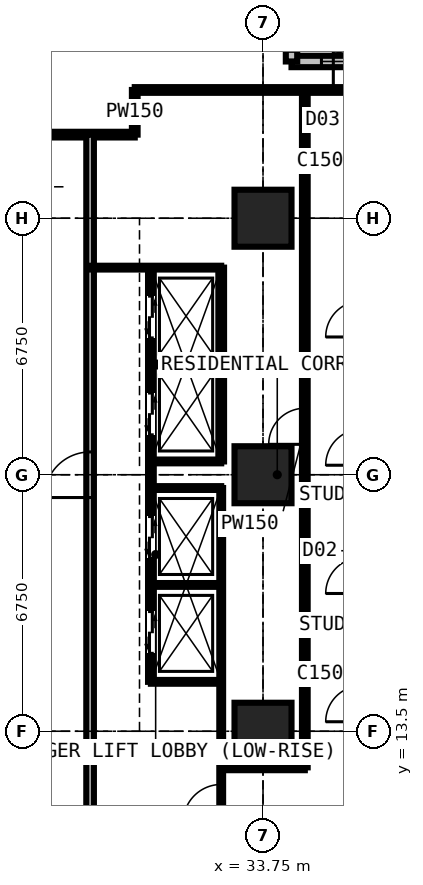
"""IFC4 building model, lengths in metres.
Left out: names, types, materials, properties, quantities, classifications, styles, units other than length and angle.
Written with IfcOpenShell. Run it as: python <this file> out.ifc"""

import sys

from ifc_helpers import new_model, si_unit, direction, frame, frame_2d, origin, origin_2d, place, context, subcontext, project, spatial, rectangle, extrude, element, fill, save


model = new_model("IFC4")
c1 = context("Model", 3, precision=1e-05, world=origin(), true_north=direction((0.0, 1.0)))
c2 = subcontext(c1, "Body", "Model", "MODEL_VIEW")
j1 = project(units=[si_unit("LENGTHUNIT", "METRE"), si_unit("PLANEANGLEUNIT", "RADIAN")], contexts=[c1])
p1 = place(None, origin())
s1 = spatial("IfcSite", under=j1, at=p1, CompositionType="ELEMENT")
p2 = place(p1, origin())
s2 = spatial("IfcBuilding", under=s1, at=p2, CompositionType="ELEMENT")
p3 = place(p2, frame((0.0, 0.0, 126.9)))
s3 = spatial("IfcBuildingStorey", under=s2, at=p3, CompositionType="ELEMENT", Elevation=126.9)
for number, where, z_axis, x_axis in (
    (1, (33.75, 13.5, 0.0), (0.0, 0.0, 1.0), (1.0, 0.0, 0.0)),
    (2, (33.75, 20.25, 0.0), (0.0, 0.0, 1.0), (1.0, 0.0, 0.0)),
    (3, (33.75, 27.0, 0.0), (0.0, 0.0, 1.0), (1.0, 0.0, 0.0)),
):
    element("IfcColumn", number, at=place(p3, frame(where, z_axis=z_axis, x_axis=x_axis)), inside=s3, PredefinedType="COLUMN", context=c2, shape_type="SweptSolid", body=[
        extrude(rectangle(XDim=1.5, YDim=1.5, at=origin_2d()), origin(), (0.0, 0.0, 1.0), 3.6),
    ])
p4 = place(p3, frame((37.875, 31.125, 0.0), z_axis=(0.0, 0.0, 1.0), x_axis=(-1.0, 0.0, 0.0)))
e4 = element("IfcWall", 4, at=p4, inside=s3, PredefinedType="SOLIDWALL", context=c2, shape_type="SweptSolid", body=[
    extrude(rectangle(XDim=3.375, YDim=0.3, at=frame_2d((1.688, 0.0))), origin(), (0.0, 0.0, 1.0), 3.375),
])
p5 = place(p4, frame((0.788, 0.0, 0.6)))
e5 = element("IfcOpeningElement", 5, at=p5, cuts=e4, PredefinedType="OPENING", context=c2, shape_type="SweptSolid", body=[
    extrude(rectangle(XDim=1.8, YDim=2.1, at=frame_2d((0.9, 1.05))), frame((0.0, 0.16, 0.0), z_axis=(0.0, -1.0, 0.0), x_axis=(1.0, 0.0, 0.0)), (0.0, 0.0, 1.0), 0.32),
])
p6 = place(p3, frame((34.5, 31.125, 0.0), z_axis=(0.0, 0.0, 1.0), x_axis=(0.0, 1.0, 0.0)))
e6 = element("IfcWall", 6, at=p6, inside=s3, PredefinedType="SOLIDWALL", context=c2, shape_type="SweptSolid", body=[
    extrude(rectangle(XDim=3.375, YDim=0.3, at=frame_2d((1.688, 0.0))), origin(), (0.0, 0.0, 1.0), 3.375),
])
p7 = place(p6, frame((0.268, 0.0, 0.9)))
e7 = element("IfcOpeningElement", 7, at=p7, cuts=e6, PredefinedType="OPENING", context=c2, shape_type="SweptSolid", body=[
    extrude(rectangle(XDim=1.5, YDim=1.8, at=frame_2d((0.75, 0.9))), frame((0.0, 0.16, 0.0), z_axis=(0.0, -1.0, 0.0), x_axis=(1.0, 0.0, 0.0)), (0.0, 0.0, 1.0), 0.32),
])
p8 = place(p3, frame((11.3, 29.2, 0.0), z_axis=(0.0, 0.0, 1.0), x_axis=(1.0, 0.0, 0.0)))
e8 = element("IfcWall", 8, at=p8, inside=s3, PredefinedType="PARTITIONING", context=c2, shape_type="SweptSolid", body=[
    extrude(rectangle(XDim=19.075, YDim=0.15, at=frame_2d((9.538, 0.0))), origin(), (0.0, 0.0, 1.0), 3.375),
])
p9 = place(p8, frame((6.4, 0.0, 0.0)))
e9 = element("IfcOpeningElement", 9, at=p9, cuts=e8, PredefinedType="OPENING", context=c2, shape_type="SweptSolid", body=[
    extrude(rectangle(XDim=0.95, YDim=2.2, at=frame_2d((0.475, 1.1))), frame((0.0, 0.085, 0.0), z_axis=(0.0, -1.0, 0.0), x_axis=(1.0, 0.0, 0.0)), (0.0, 0.0, 1.0), 0.17),
])
p10 = place(p8, frame((9.2, 0.0, 0.0)))
e10 = element("IfcOpeningElement", 10, at=p10, cuts=e8, PredefinedType="OPENING", context=c2, shape_type="SweptSolid", body=[
    extrude(rectangle(XDim=0.95, YDim=2.2, at=frame_2d((0.475, 1.1))), frame((0.0, 0.085, 0.0), z_axis=(0.0, -1.0, 0.0), x_axis=(1.0, 0.0, 0.0)), (0.0, 0.0, 1.0), 0.17),
])
p11 = place(p8, frame((0.6, 0.0, 0.0)))
e11 = element("IfcOpeningElement", 11, at=p11, cuts=e8, PredefinedType="OPENING", context=c2, shape_type="SweptSolid", body=[
    extrude(rectangle(XDim=1.0, YDim=2.2, at=frame_2d((0.5, 1.1))), frame((0.0, 0.085, 0.0), z_axis=(0.0, -1.0, 0.0), x_axis=(1.0, 0.0, 0.0)), (0.0, 0.0, 1.0), 0.17),
])
p12 = place(p3, frame((29.2, 11.3, 0.0), z_axis=(0.0, 0.0, 1.0), x_axis=(0.0, 1.0, 0.0)))
e12 = element("IfcWall", 12, at=p12, inside=s3, PredefinedType="PARTITIONING", context=c2, shape_type="SweptSolid", body=[
    extrude(rectangle(XDim=17.9, YDim=0.2, at=frame_2d((8.95, 0.0))), origin(), (0.0, 0.0, 1.0), 3.375),
])
p13 = place(p12, frame((8.35, 0.0, 0.0)))
e13 = element("IfcOpeningElement", 13, at=p13, cuts=e12, PredefinedType="OPENING", context=c2, shape_type="SweptSolid", body=[
    extrude(rectangle(XDim=1.2, YDim=2.2, at=frame_2d((0.6, 1.1))), frame((0.0, 0.11, 0.0), z_axis=(0.0, -1.0, 0.0), x_axis=(1.0, 0.0, 0.0)), (0.0, 0.0, 1.0), 0.22),
])
p14 = place(p3, frame((29.2, 25.7, 0.0), z_axis=(0.0, 0.0, 1.0), x_axis=(1.0, 0.0, 0.0)))
e14 = element("IfcWall", 14, at=p14, inside=s3, PredefinedType="SHEAR", context=c2, shape_type="SweptSolid", body=[
    extrude(rectangle(XDim=3.45, YDim=0.1, at=frame_2d((1.725, 0.0))), origin(), (0.0, 0.0, 1.0), 3.375),
])
p15 = place(p3, frame((30.375, 29.2, 0.0), z_axis=(0.0, 0.0, 1.0), x_axis=(0.0, 1.0, 0.0)))
e15 = element("IfcWall", 15, at=p15, inside=s3, PredefinedType="PARTITIONING", context=c2, shape_type="SweptSolid", body=[
    extrude(rectangle(XDim=1.175, YDim=0.15, at=frame_2d((0.587, 0.0))), origin(), (0.0, 0.0, 1.0), 3.375),
])
p16 = place(p3, frame((30.375, 30.375, 0.0), z_axis=(0.0, 0.0, 1.0), x_axis=(1.0, 0.0, 0.0)))
e16 = element("IfcWall", 16, at=p16, inside=s3, PredefinedType="PARTITIONING", context=c2, shape_type="SweptSolid", body=[
    extrude(rectangle(XDim=7.35, YDim=0.15, at=frame_2d((3.675, 0.0))), origin(), (0.0, 0.0, 1.0), 2.877),
])
p17 = place(p16, frame((5.225, 0.0, 0.0)))
e17 = element("IfcOpeningElement", 17, at=p17, cuts=e16, PredefinedType="OPENING", context=c2, shape_type="SweptSolid", body=[
    extrude(rectangle(XDim=1.0, YDim=2.2, at=frame_2d((0.5, 1.1))), frame((0.0, 0.085, 0.0), z_axis=(0.0, -1.0, 0.0), x_axis=(1.0, 0.0, 0.0)), (0.0, 0.0, 1.0), 0.17),
])
p18 = place(p3, frame((30.8, 14.8, 0.0), z_axis=(0.0, 0.0, 1.0), x_axis=(0.0, 1.0, 0.0)))
e18 = element("IfcWall", 18, at=p18, inside=s3, PredefinedType="PARTITIONING", context=c2, shape_type="SweptSolid", body=[
    extrude(rectangle(XDim=10.9, YDim=0.15, at=frame_2d((5.45, 0.0))), origin(), (0.0, 0.0, 1.0), 3.375),
])
p19 = place(p18, frame((0.75, 0.0, 0.0)))
e19 = element("IfcOpeningElement", 19, at=p19, cuts=e18, PredefinedType="OPENING", context=c2, shape_type="SweptSolid", body=[
    extrude(rectangle(XDim=1.1, YDim=2.2, at=frame_2d((0.55, 1.1))), frame((0.0, 0.085, 0.0), z_axis=(0.0, -1.0, 0.0), x_axis=(1.0, 0.0, 0.0)), (0.0, 0.0, 1.0), 0.17),
])
p20 = place(p18, frame((3.25, 0.0, 0.0)))
e20 = element("IfcOpeningElement", 20, at=p20, cuts=e18, PredefinedType="OPENING", context=c2, shape_type="SweptSolid", body=[
    extrude(rectangle(XDim=1.1, YDim=2.2, at=frame_2d((0.55, 1.1))), frame((0.0, 0.085, 0.0), z_axis=(0.0, -1.0, 0.0), x_axis=(1.0, 0.0, 0.0)), (0.0, 0.0, 1.0), 0.17),
])
p21 = place(p18, frame((6.5, 0.0, 0.0)))
e21 = element("IfcOpeningElement", 21, at=p21, cuts=e18, PredefinedType="OPENING", context=c2, shape_type="SweptSolid", body=[
    extrude(rectangle(XDim=1.1, YDim=2.2, at=frame_2d((0.55, 1.1))), frame((0.0, 0.085, 0.0), z_axis=(0.0, -1.0, 0.0), x_axis=(1.0, 0.0, 0.0)), (0.0, 0.0, 1.0), 0.17),
])
p22 = place(p18, frame((9.05, 0.0, 0.0)))
e22 = element("IfcOpeningElement", 22, at=p22, cuts=e18, PredefinedType="OPENING", context=c2, shape_type="SweptSolid", body=[
    extrude(rectangle(XDim=1.1, YDim=2.2, at=frame_2d((0.55, 1.1))), frame((0.0, 0.085, 0.0), z_axis=(0.0, -1.0, 0.0), x_axis=(1.0, 0.0, 0.0)), (0.0, 0.0, 1.0), 0.17),
])
for number, where, z_axis, x_axis in (
    (23, (30.8, 14.8, 0.0), (0.0, 0.0, 1.0), (1.0, 0.0, 0.0)),
    (24, (30.8, 17.35, 0.0), (0.0, 0.0, 1.0), (1.0, 0.0, 0.0)),
    (25, (30.8, 19.9, 0.0), (0.0, 0.0, 1.0), (1.0, 0.0, 0.0)),
    (26, (30.8, 20.6, 0.0), (0.0, 0.0, 1.0), (1.0, 0.0, 0.0)),
    (27, (30.8, 23.15, 0.0), (0.0, 0.0, 1.0), (1.0, 0.0, 0.0)),
):
    element("IfcWall", number, at=place(p3, frame(where, z_axis=z_axis, x_axis=x_axis)), inside=s3, PredefinedType="SHEAR", context=c2, shape_type="SweptSolid", body=[
        extrude(rectangle(XDim=1.85, YDim=0.1, at=frame_2d((0.925, 0.0))), origin(), (0.0, 0.0, 1.0), 3.375),
    ])
p23 = place(p3, frame((32.65, 10.6, 0.0), z_axis=(0.0, 0.0, 1.0), x_axis=(0.0, 1.0, 0.0)))
e28 = element("IfcWall", 28, at=p23, inside=s3, PredefinedType="SHEAR", context=c2, shape_type="SweptSolid", body=[
    extrude(rectangle(XDim=9.3, YDim=0.1, at=frame_2d((4.65, 0.0))), origin(), (0.0, 0.0, 1.0), 3.375),
])
p24 = place(p23, frame((0.5, 0.0, 0.0)))
e29 = element("IfcOpeningElement", 29, at=p24, cuts=e28, PredefinedType="OPENING", context=c2, shape_type="SweptSolid", body=[
    extrude(rectangle(XDim=1.0, YDim=2.2, at=frame_2d((0.5, 1.1))), frame((0.0, 0.06, 0.0), z_axis=(0.0, -1.0, 0.0), x_axis=(1.0, 0.0, 0.0)), (0.0, 0.0, 1.0), 0.12),
])
p25 = place(p3, frame((32.65, 12.55, 0.0), z_axis=(0.0, 0.0, 1.0), x_axis=(1.0, 0.0, 0.0)))
e30 = element("IfcWall", 30, at=p25, inside=s3, PredefinedType="PARTITIONING", context=c2, shape_type="SweptSolid", body=[
    extrude(rectangle(XDim=2.2, YDim=0.15, at=frame_2d((1.1, 0.0))), origin(), (0.0, 0.0, 1.0), 3.375),
])
p26 = place(p3, frame((32.65, 20.6, 0.0), z_axis=(0.0, 0.0, 1.0), x_axis=(0.0, 1.0, 0.0)))
e31 = element("IfcWall", 31, at=p26, inside=s3, PredefinedType="PARTITIONING", context=c2, shape_type="SweptSolid", body=[
    extrude(rectangle(XDim=5.1, YDim=0.15, at=frame_2d((2.55, 0.0))), origin(), (0.0, 0.0, 1.0), 3.375),
])
p27 = place(p3, frame((34.85, 12.55, 0.0), z_axis=(0.0, 0.0, 1.0), x_axis=(0.0, 1.0, 0.0)))
e32 = element("IfcWall", 32, at=p27, inside=s3, PredefinedType="PARTITIONING", context=c2, shape_type="SweptSolid", body=[
    extrude(rectangle(XDim=17.825, YDim=0.15, at=frame_2d((8.913, 0.0))), origin(), (0.0, 0.0, 1.0), 3.375),
])
p28 = place(p27, frame((8.5, 0.0, 0.0)))
e33 = element("IfcOpeningElement", 33, at=p28, cuts=e32, PredefinedType="OPENING", context=c2, shape_type="SweptSolid", body=[
    extrude(rectangle(XDim=0.95, YDim=2.2, at=frame_2d((0.475, 1.1))), frame((0.0, 0.085, 0.0), z_axis=(0.0, -1.0, 0.0), x_axis=(1.0, 0.0, 0.0)), (0.0, 0.0, 1.0), 0.17),
])
p29 = place(p5, origin())
e34 = element("IfcWindow", 34, at=p29, inside=s3, PartitioningType="SINGLE_PANEL", PredefinedType="WINDOW", context=c2, shape_type="SweptSolid", body=[
    extrude(rectangle(XDim=1.8, YDim=2.1, at=frame_2d((0.9, 1.05))), frame((0.0, 0.03, 0.0), z_axis=(0.0, -1.0, 0.0), x_axis=(1.0, 0.0, 0.0)), (0.0, 0.0, 1.0), 0.06),
])
fill(e5, e34)
p30 = place(p24, origin())
e35 = element("IfcDoor", 35, at=p30, inside=s3, OperationType="SINGLE_SWING_LEFT", PredefinedType="DOOR", context=c2, shape_type="SweptSolid", body=[
    extrude(rectangle(XDim=1.0, YDim=2.2, at=frame_2d((0.5, 1.1))), frame((0.0, 0.025, 0.0), z_axis=(0.0, -1.0, 0.0), x_axis=(1.0, 0.0, 0.0)), (0.0, 0.0, 1.0), 0.05),
])
fill(e29, e35)
p31 = place(p28, origin())
e36 = element("IfcDoor", 36, at=p31, inside=s3, OperationType="SINGLE_SWING_LEFT", PredefinedType="DOOR", context=c2, shape_type="SweptSolid", body=[
    extrude(rectangle(XDim=0.95, YDim=2.2, at=frame_2d((0.475, 1.1))), frame((0.0, 0.025, 0.0), z_axis=(0.0, -1.0, 0.0), x_axis=(1.0, 0.0, 0.0)), (0.0, 0.0, 1.0), 0.05),
])
fill(e33, e36)
p32 = place(p17, origin())
e37 = element("IfcDoor", 37, at=p32, inside=s3, OperationType="SINGLE_SWING_LEFT", PredefinedType="DOOR", context=c2, shape_type="SweptSolid", body=[
    extrude(rectangle(XDim=1.0, YDim=2.2, at=frame_2d((0.5, 1.1))), frame((0.0, 0.025, 0.0), z_axis=(0.0, -1.0, 0.0), x_axis=(1.0, 0.0, 0.0)), (0.0, 0.0, 1.0), 0.05),
])
fill(e17, e37)
p33 = place(p19, origin())
e38 = element("IfcDoor", 38, at=p33, inside=s3, OperationType="DOUBLE_DOOR_SLIDING", PredefinedType="DOOR", context=c2, shape_type="SweptSolid", body=[
    extrude(rectangle(XDim=1.1, YDim=2.2, at=frame_2d((0.55, 1.1))), frame((0.0, 0.025, 0.0), z_axis=(0.0, -1.0, 0.0), x_axis=(1.0, 0.0, 0.0)), (0.0, 0.0, 1.0), 0.05),
])
fill(e19, e38)
p34 = place(p20, origin())
e39 = element("IfcDoor", 39, at=p34, inside=s3, OperationType="DOUBLE_DOOR_SLIDING", PredefinedType="DOOR", context=c2, shape_type="SweptSolid", body=[
    extrude(rectangle(XDim=1.1, YDim=2.2, at=frame_2d((0.55, 1.1))), frame((0.0, 0.025, 0.0), z_axis=(0.0, -1.0, 0.0), x_axis=(1.0, 0.0, 0.0)), (0.0, 0.0, 1.0), 0.05),
])
fill(e20, e39)
p35 = place(p21, origin())
e40 = element("IfcDoor", 40, at=p35, inside=s3, OperationType="DOUBLE_DOOR_SLIDING", PredefinedType="DOOR", context=c2, shape_type="SweptSolid", body=[
    extrude(rectangle(XDim=1.1, YDim=2.2, at=frame_2d((0.55, 1.1))), frame((0.0, 0.025, 0.0), z_axis=(0.0, -1.0, 0.0), x_axis=(1.0, 0.0, 0.0)), (0.0, 0.0, 1.0), 0.05),
])
fill(e21, e40)
p36 = place(p22, origin())
e41 = element("IfcDoor", 41, at=p36, inside=s3, OperationType="DOUBLE_DOOR_SLIDING", PredefinedType="DOOR", context=c2, shape_type="SweptSolid", body=[
    extrude(rectangle(XDim=1.1, YDim=2.2, at=frame_2d((0.55, 1.1))), frame((0.0, 0.025, 0.0), z_axis=(0.0, -1.0, 0.0), x_axis=(1.0, 0.0, 0.0)), (0.0, 0.0, 1.0), 0.05),
])
fill(e22, e41)
p37 = place(p13, origin())
e42 = element("IfcDoor", 42, at=p37, inside=s3, OperationType="DOUBLE_DOOR_SINGLE_SWING", PredefinedType="DOOR", context=c2, shape_type="SweptSolid", body=[
    extrude(rectangle(XDim=1.2, YDim=2.2, at=frame_2d((0.6, 1.1))), frame((0.0, 0.025, 0.0), z_axis=(0.0, -1.0, 0.0), x_axis=(1.0, 0.0, 0.0)), (0.0, 0.0, 1.0), 0.05),
])
fill(e13, e42)
save(model, sys.argv[1])
